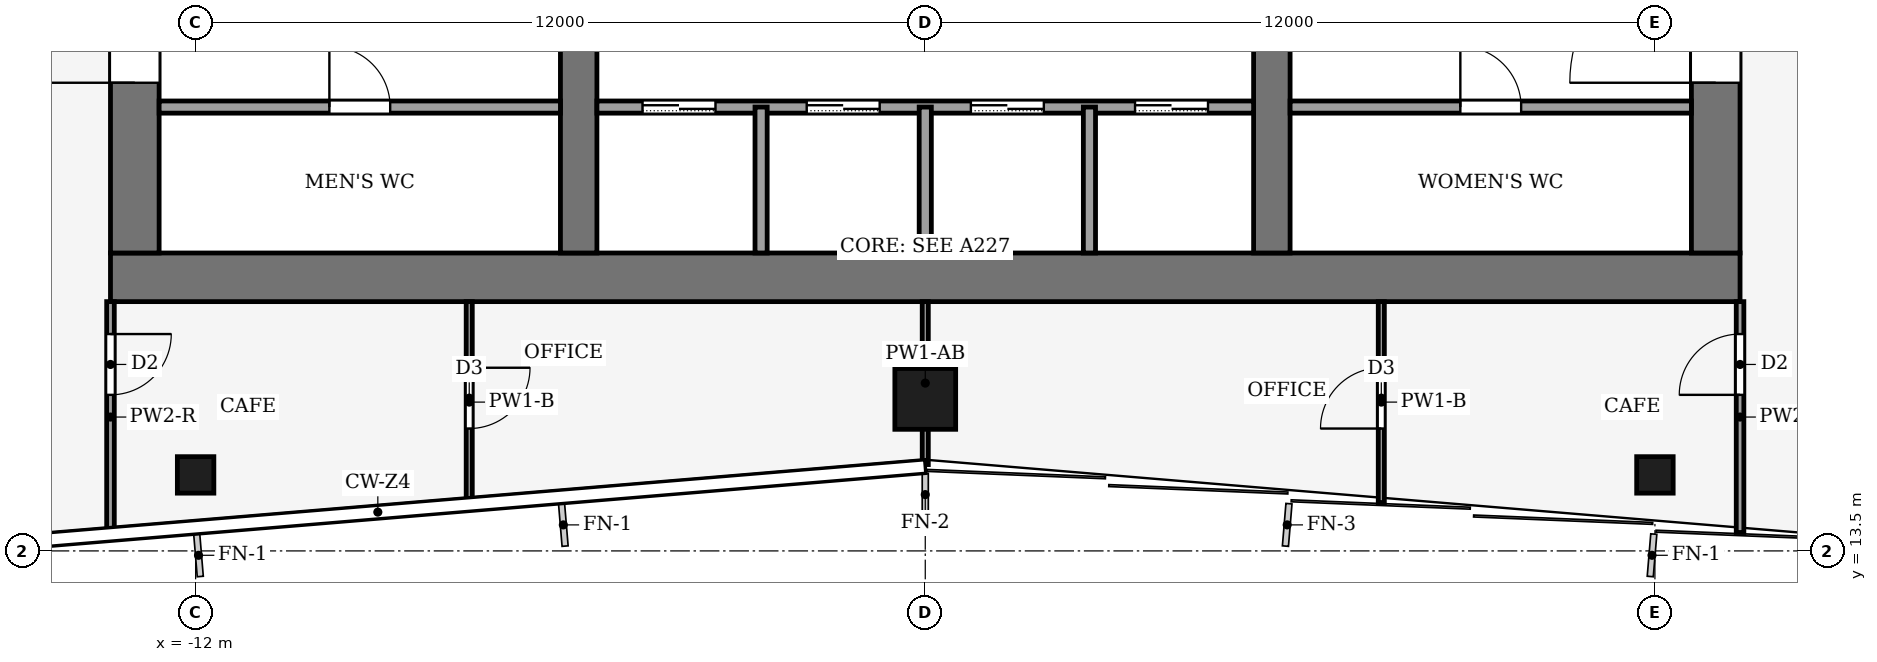
"""IFC4 building model, lengths in metres.
Left out: names, types, materials, properties, quantities, classifications, styles, units other than length and angle.
Written with IfcOpenShell. Run it as: python <this file> out.ifc"""

import sys

from ifc_helpers import new_model, si_unit, direction, frame, frame_2d, origin, origin_2d, place, context, subcontext, project, spatial, rectangle, hollow_rectangle, extrude, element, fill, save


model = new_model("IFC4")
c1 = context("Model", 3, precision=1e-05, world=origin(), true_north=direction((0.0, 1.0)))
c2 = subcontext(c1, "Body", "Model", "MODEL_VIEW")
j1 = project(units=[si_unit("LENGTHUNIT", "METRE"), si_unit("PLANEANGLEUNIT", "RADIAN")], contexts=[c1])
p1 = place(None, origin())
s1 = spatial("IfcSite", under=j1, at=p1, CompositionType="ELEMENT")
p2 = place(p1, origin())
s2 = spatial("IfcBuilding", under=s1, at=p2, CompositionType="ELEMENT")
p3 = place(p2, frame((0.0, 0.0, 233.0)))
s3 = spatial("IfcBuildingStorey", under=s2, at=p3, CompositionType="ELEMENT", Elevation=233.0)
p4 = place(p3, frame((-13.4, 18.0, -0.13), z_axis=(0.0, 0.0, 1.0), x_axis=(1.0, 0.0, 0.0)))
e1 = element("IfcWall", 1, at=p4, inside=s3, PredefinedType="SHEAR", context=c2, shape_type="SweptSolid", body=[
    extrude(rectangle(XDim=26.8, YDim=0.8, at=frame_2d((13.4, 0.0))), origin(), (0.0, 0.0, 1.0), 5.0),
])
p5 = place(p3, frame((-13.0, 18.4, -0.13), z_axis=(0.0, 0.0, 1.0), x_axis=(0.0, 1.0, 0.0)))
e2 = element("IfcWall", 2, at=p5, inside=s3, PredefinedType="SHEAR", context=c2, shape_type="SweptSolid", body=[
    extrude(rectangle(XDim=19.2, YDim=0.8, at=frame_2d((9.6, 0.0))), origin(), (0.0, 0.0, 1.0), 5.0),
])
p6 = place(p5, frame((2.8, 0.0, 0.13)))
e3 = element("IfcOpeningElement", 3, at=p6, cuts=e2, PredefinedType="OPENING", context=c2, shape_type="SweptSolid", body=[
    extrude(rectangle(XDim=2.4, YDim=2.4, at=frame_2d((1.2, 1.2))), frame((0.0, 0.41, 0.0), z_axis=(0.0, -1.0, 0.0), x_axis=(1.0, 0.0, 0.0)), (0.0, 0.0, 1.0), 0.82),
])
p7 = place(p5, frame((13.4, 0.0, 0.13)))
e4 = element("IfcOpeningElement", 4, at=p7, cuts=e2, PredefinedType="OPENING", context=c2, shape_type="SweptSolid", body=[
    extrude(rectangle(XDim=1.4, YDim=2.2, at=frame_2d((0.7, 1.1))), frame((0.0, 0.41, 0.0), z_axis=(0.0, -1.0, 0.0), x_axis=(1.0, 0.0, 0.0)), (0.0, 0.0, 1.0), 0.82),
])
p8 = place(p3, frame((13.0, 18.4, -0.13), z_axis=(0.0, 0.0, 1.0), x_axis=(0.0, 1.0, 0.0)))
e5 = element("IfcWall", 5, at=p8, inside=s3, PredefinedType="SHEAR", context=c2, shape_type="SweptSolid", body=[
    extrude(rectangle(XDim=19.2, YDim=0.8, at=frame_2d((9.6, 0.0))), origin(), (0.0, 0.0, 1.0), 5.0),
])
p9 = place(p8, frame((2.8, 0.0, 0.13)))
e6 = element("IfcOpeningElement", 6, at=p9, cuts=e5, PredefinedType="OPENING", context=c2, shape_type="SweptSolid", body=[
    extrude(rectangle(XDim=2.4, YDim=2.4, at=frame_2d((1.2, 1.2))), frame((0.0, 0.41, 0.0), z_axis=(0.0, -1.0, 0.0), x_axis=(1.0, 0.0, 0.0)), (0.0, 0.0, 1.0), 0.82),
])
p10 = place(p8, frame((13.3, 0.0, 0.13)))
e7 = element("IfcOpeningElement", 7, at=p10, cuts=e5, PredefinedType="OPENING", context=c2, shape_type="SweptSolid", body=[
    extrude(rectangle(XDim=2.4, YDim=2.4, at=frame_2d((1.2, 1.2))), frame((0.0, 0.41, 0.0), z_axis=(0.0, -1.0, 0.0), x_axis=(1.0, 0.0, 0.0)), (0.0, 0.0, 1.0), 0.82),
])
p11 = place(p3, frame((-5.7, 18.4, -0.13), z_axis=(0.0, 0.0, 1.0), x_axis=(0.0, 1.0, 0.0)))
e8 = element("IfcWall", 8, at=p11, inside=s3, PredefinedType="SHEAR", context=c2, shape_type="SweptSolid", body=[
    extrude(rectangle(XDim=19.2, YDim=0.6, at=frame_2d((9.6, 0.0))), origin(), (0.0, 0.0, 1.0), 5.0),
])
p12 = place(p11, frame((8.35, 0.0, 0.13)))
e9 = element("IfcOpeningElement", 9, at=p12, cuts=e8, PredefinedType="OPENING", context=c2, shape_type="SweptSolid", body=[
    extrude(rectangle(XDim=0.9, YDim=2.1, at=frame_2d((0.45, 1.05))), frame((0.0, 0.31, 0.0), z_axis=(0.0, -1.0, 0.0), x_axis=(1.0, 0.0, 0.0)), (0.0, 0.0, 1.0), 0.62),
])
p13 = place(p3, frame((5.7, 18.4, -0.13), z_axis=(0.0, 0.0, 1.0), x_axis=(0.0, 1.0, 0.0)))
e10 = element("IfcWall", 10, at=p13, inside=s3, PredefinedType="SHEAR", context=c2, shape_type="SweptSolid", body=[
    extrude(rectangle(XDim=19.2, YDim=0.6, at=frame_2d((9.6, 0.0))), origin(), (0.0, 0.0, 1.0), 5.0),
])
p14 = place(p13, frame((13.3, 0.0, 0.13)))
e11 = element("IfcOpeningElement", 11, at=p14, cuts=e10, PredefinedType="OPENING", context=c2, shape_type="SweptSolid", body=[
    extrude(rectangle(XDim=2.4, YDim=2.4, at=frame_2d((1.2, 1.2))), frame((0.0, 0.31, 0.0), z_axis=(0.0, -1.0, 0.0), x_axis=(1.0, 0.0, 0.0)), (0.0, 0.0, 1.0), 0.62),
])
p15 = place(p3, frame((0.0, 16.0, 0.0), z_axis=(0.0, 0.0, 1.0), x_axis=(1.0, 0.0, 0.0)))
e12 = element("IfcColumn", 12, at=p15, inside=s3, PredefinedType="COLUMN", context=c2, shape_type="SweptSolid", body=[
    extrude(hollow_rectangle(XDim=1.0, YDim=1.0, WallThickness=0.045, at=origin_2d()), origin(), (0.0, 0.0, 1.0), 5.0),
])
for number, where, z_axis, x_axis in (
    (13, (-12.0, 14.75, 0.0), (0.0, 0.0, 1.0), (1.0, 0.0, 0.0)),
    (14, (12.0, 14.75, 0.0), (0.0, 0.0, 1.0), (1.0, 0.0, 0.0)),
):
    element("IfcColumn", number, at=place(p3, frame(where, z_axis=z_axis, x_axis=x_axis)), inside=s3, PredefinedType="COLUMN", context=c2, shape_type="SweptSolid", body=[
        extrude(hollow_rectangle(XDim=0.6, YDim=0.6, WallThickness=0.025, at=origin_2d()), origin(), (0.0, 0.0, 1.0), 5.0),
    ])
p16 = place(p3, frame((-12.6, 20.8, 0.0), z_axis=(0.0, 0.0, 1.0), x_axis=(1.0, 0.0, 0.0)))
e15 = element("IfcWall", 15, at=p16, inside=s3, PredefinedType="PARTITIONING", context=c2, shape_type="SweptSolid", body=[
    extrude(rectangle(XDim=6.6, YDim=0.2, at=frame_2d((3.3, 0.0))), origin(), (0.0, 0.0, 1.0), 4.87),
])
p17 = place(p16, frame((2.8, 0.0, 0.0)))
e16 = element("IfcOpeningElement", 16, at=p17, cuts=e15, PredefinedType="OPENING", context=c2, shape_type="SweptSolid", body=[
    extrude(rectangle(XDim=1.0, YDim=2.1, at=frame_2d((0.5, 1.05))), frame((0.0, 0.11, 0.0), z_axis=(0.0, -1.0, 0.0), x_axis=(1.0, 0.0, 0.0)), (0.0, 0.0, 1.0), 0.22),
])
p18 = place(p3, frame((-5.4, 20.8, 0.0), z_axis=(0.0, 0.0, 1.0), x_axis=(1.0, 0.0, 0.0)))
e17 = element("IfcWall", 17, at=p18, inside=s3, PredefinedType="PARTITIONING", context=c2, shape_type="SweptSolid", body=[
    extrude(rectangle(XDim=10.8, YDim=0.2, at=frame_2d((5.4, 0.0))), origin(), (0.0, 0.0, 1.0), 4.87),
])
p19 = place(p18, frame((0.75, 0.0, 0.0)))
e18 = element("IfcOpeningElement", 18, at=p19, cuts=e17, PredefinedType="OPENING", context=c2, shape_type="SweptSolid", body=[
    extrude(rectangle(XDim=1.2, YDim=2.2, at=frame_2d((0.6, 1.1))), frame((0.0, 0.11, 0.0), z_axis=(0.0, -1.0, 0.0), x_axis=(1.0, 0.0, 0.0)), (0.0, 0.0, 1.0), 0.22),
])
p20 = place(p18, frame((3.45, 0.0, 0.0)))
e19 = element("IfcOpeningElement", 19, at=p20, cuts=e17, PredefinedType="OPENING", context=c2, shape_type="SweptSolid", body=[
    extrude(rectangle(XDim=1.2, YDim=2.2, at=frame_2d((0.6, 1.1))), frame((0.0, 0.11, 0.0), z_axis=(0.0, -1.0, 0.0), x_axis=(1.0, 0.0, 0.0)), (0.0, 0.0, 1.0), 0.22),
])
p21 = place(p18, frame((6.15, 0.0, 0.0)))
e20 = element("IfcOpeningElement", 20, at=p21, cuts=e17, PredefinedType="OPENING", context=c2, shape_type="SweptSolid", body=[
    extrude(rectangle(XDim=1.2, YDim=2.2, at=frame_2d((0.6, 1.1))), frame((0.0, 0.11, 0.0), z_axis=(0.0, -1.0, 0.0), x_axis=(1.0, 0.0, 0.0)), (0.0, 0.0, 1.0), 0.22),
])
p22 = place(p18, frame((8.85, 0.0, 0.0)))
e21 = element("IfcOpeningElement", 21, at=p22, cuts=e17, PredefinedType="OPENING", context=c2, shape_type="SweptSolid", body=[
    extrude(rectangle(XDim=1.2, YDim=2.2, at=frame_2d((0.6, 1.1))), frame((0.0, 0.11, 0.0), z_axis=(0.0, -1.0, 0.0), x_axis=(1.0, 0.0, 0.0)), (0.0, 0.0, 1.0), 0.22),
])
p23 = place(p3, frame((6.0, 20.8, 0.0), z_axis=(0.0, 0.0, 1.0), x_axis=(1.0, 0.0, 0.0)))
e22 = element("IfcWall", 22, at=p23, inside=s3, PredefinedType="PARTITIONING", context=c2, shape_type="SweptSolid", body=[
    extrude(rectangle(XDim=6.6, YDim=0.2, at=frame_2d((3.3, 0.0))), origin(), (0.0, 0.0, 1.0), 4.87),
])
p24 = place(p23, frame((2.8, 0.0, 0.0)))
e23 = element("IfcOpeningElement", 23, at=p24, cuts=e22, PredefinedType="OPENING", context=c2, shape_type="SweptSolid", body=[
    extrude(rectangle(XDim=1.0, YDim=2.1, at=frame_2d((0.5, 1.05))), frame((0.0, 0.11, 0.0), z_axis=(0.0, -1.0, 0.0), x_axis=(1.0, 0.0, 0.0)), (0.0, 0.0, 1.0), 0.22),
])
for number, where, z_axis, x_axis in (
    (24, (-2.7, 18.4, 0.0), (0.0, 0.0, 1.0), (0.0, 1.0, 0.0)),
    (25, (0.0, 18.4, 0.0), (0.0, 0.0, 1.0), (0.0, 1.0, 0.0)),
    (26, (2.7, 18.4, 0.0), (0.0, 0.0, 1.0), (0.0, 1.0, 0.0)),
):
    element("IfcWall", number, at=place(p3, frame(where, z_axis=z_axis, x_axis=x_axis)), inside=s3, PredefinedType="PARTITIONING", context=c2, shape_type="SweptSolid", body=[
        extrude(rectangle(XDim=2.4, YDim=0.2, at=frame_2d((1.2, 0.0))), origin(), (0.0, 0.0, 1.0), 4.87),
    ])
p25 = place(p3, frame((-13.4, 17.6, 0.0), z_axis=(0.0, 0.0, 1.0), x_axis=(0.0, -1.0, 0.0)))
e27 = element("IfcWall", 27, at=p25, inside=s3, PredefinedType="PARTITIONING", context=c2, shape_type="SweptSolid", body=[
    extrude(rectangle(XDim=3.797, YDim=0.125, at=frame_2d((1.898, 0.0))), origin(), (0.0, 0.0, 1.0), 4.04),
])
p26 = place(p25, frame((0.533, 0.0, 0.0)))
e28 = element("IfcOpeningElement", 28, at=p26, cuts=e27, PredefinedType="OPENING", context=c2, shape_type="SweptSolid", body=[
    extrude(rectangle(XDim=1.0, YDim=2.1, at=frame_2d((0.5, 1.05))), frame((0.0, 0.073, 0.0), z_axis=(0.0, -1.0, 0.0), x_axis=(1.0, 0.0, 0.0)), (0.0, 0.0, 1.0), 0.145),
])
p27 = place(p3, frame((13.4, 13.803, 0.0), z_axis=(0.0, 0.0, 1.0), x_axis=(0.0, 1.0, 0.0)))
e29 = element("IfcWall", 29, at=p27, inside=s3, PredefinedType="PARTITIONING", context=c2, shape_type="SweptSolid", body=[
    extrude(rectangle(XDim=3.797, YDim=0.125, at=frame_2d((1.898, 0.0))), origin(), (0.0, 0.0, 1.0), 4.04),
])
p28 = place(p27, frame((2.263, 0.0, 0.0)))
e30 = element("IfcOpeningElement", 30, at=p28, cuts=e29, PredefinedType="OPENING", context=c2, shape_type="SweptSolid", body=[
    extrude(rectangle(XDim=1.0, YDim=2.1, at=frame_2d((0.5, 1.05))), frame((0.0, 0.073, 0.0), z_axis=(0.0, -1.0, 0.0), x_axis=(1.0, 0.0, 0.0)), (0.0, 0.0, 1.0), 0.145),
])
p29 = place(p3, frame((-7.5, 17.6, 0.0), z_axis=(0.0, 0.0, 1.0), x_axis=(0.0, -1.0, 0.0)))
e31 = element("IfcWall", 31, at=p29, inside=s3, PredefinedType="PARTITIONING", context=c2, shape_type="SweptSolid", body=[
    extrude(rectangle(XDim=3.305, YDim=0.1, at=frame_2d((1.653, 0.0))), origin(), (0.0, 0.0, 1.0), 4.04),
])
p30 = place(p29, frame((1.087, 0.0, 0.0)))
e32 = element("IfcOpeningElement", 32, at=p30, cuts=e31, PredefinedType="OPENING", context=c2, shape_type="SweptSolid", body=[
    extrude(rectangle(XDim=1.0, YDim=2.1, at=frame_2d((0.5, 1.05))), frame((0.0, 0.06, 0.0), z_axis=(0.0, -1.0, 0.0), x_axis=(1.0, 0.0, 0.0)), (0.0, 0.0, 1.0), 0.12),
])
p31 = place(p3, frame((0.0, 14.92, 0.0), z_axis=(0.0, 0.0, 1.0), x_axis=(0.0, 1.0, 0.0)))
e33 = element("IfcWall", 33, at=p31, inside=s3, PredefinedType="PARTITIONING", context=c2, shape_type="SweptSolid", body=[
    extrude(rectangle(XDim=2.68, YDim=0.1, at=frame_2d((1.34, 0.0))), origin(), (0.0, 0.0, 1.0), 4.54),
])
p32 = place(p3, frame((7.5, 14.295, 0.0), z_axis=(0.0, 0.0, 1.0), x_axis=(0.0, 1.0, 0.0)))
e34 = element("IfcWall", 34, at=p32, inside=s3, PredefinedType="PARTITIONING", context=c2, shape_type="SweptSolid", body=[
    extrude(rectangle(XDim=3.305, YDim=0.1, at=frame_2d((1.653, 0.0))), origin(), (0.0, 0.0, 1.0), 4.04),
])
p33 = place(p32, frame((1.218, 0.0, 0.0)))
e35 = element("IfcOpeningElement", 35, at=p33, cuts=e34, PredefinedType="OPENING", context=c2, shape_type="SweptSolid", body=[
    extrude(rectangle(XDim=1.0, YDim=2.1, at=frame_2d((0.5, 1.05))), frame((0.0, 0.06, 0.0), z_axis=(0.0, -1.0, 0.0), x_axis=(1.0, 0.0, 0.0)), (0.0, 0.0, 1.0), 0.12),
])
p34 = place(p19, origin())
e36 = element("IfcDoor", 36, at=p34, inside=s3, OperationType="SLIDING_TO_LEFT", PredefinedType="DOOR", context=c2, shape_type="SweptSolid", body=[
    extrude(rectangle(XDim=1.2, YDim=2.2, at=frame_2d((0.6, 1.1))), frame((0.0, 0.025, 0.0), z_axis=(0.0, -1.0, 0.0), x_axis=(1.0, 0.0, 0.0)), (0.0, 0.0, 1.0), 0.05),
])
fill(e18, e36)
p35 = place(p20, origin())
e37 = element("IfcDoor", 37, at=p35, inside=s3, OperationType="SLIDING_TO_LEFT", PredefinedType="DOOR", context=c2, shape_type="SweptSolid", body=[
    extrude(rectangle(XDim=1.2, YDim=2.2, at=frame_2d((0.6, 1.1))), frame((0.0, 0.025, 0.0), z_axis=(0.0, -1.0, 0.0), x_axis=(1.0, 0.0, 0.0)), (0.0, 0.0, 1.0), 0.05),
])
fill(e19, e37)
p36 = place(p21, origin())
e38 = element("IfcDoor", 38, at=p36, inside=s3, OperationType="SLIDING_TO_LEFT", PredefinedType="DOOR", context=c2, shape_type="SweptSolid", body=[
    extrude(rectangle(XDim=1.2, YDim=2.2, at=frame_2d((0.6, 1.1))), frame((0.0, 0.025, 0.0), z_axis=(0.0, -1.0, 0.0), x_axis=(1.0, 0.0, 0.0)), (0.0, 0.0, 1.0), 0.05),
])
fill(e20, e38)
p37 = place(p22, origin())
e39 = element("IfcDoor", 39, at=p37, inside=s3, OperationType="SLIDING_TO_LEFT", PredefinedType="DOOR", context=c2, shape_type="SweptSolid", body=[
    extrude(rectangle(XDim=1.2, YDim=2.2, at=frame_2d((0.6, 1.1))), frame((0.0, 0.025, 0.0), z_axis=(0.0, -1.0, 0.0), x_axis=(1.0, 0.0, 0.0)), (0.0, 0.0, 1.0), 0.05),
])
fill(e21, e39)
p38 = place(p17, origin())
e40 = element("IfcDoor", 40, at=p38, inside=s3, OperationType="SINGLE_SWING_LEFT", PredefinedType="DOOR", context=c2, shape_type="SweptSolid", body=[
    extrude(rectangle(XDim=1.0, YDim=2.1, at=frame_2d((0.5, 1.05))), frame((0.0, 0.025, 0.0), z_axis=(0.0, -1.0, 0.0), x_axis=(1.0, 0.0, 0.0)), (0.0, 0.0, 1.0), 0.05),
])
fill(e16, e40)
p39 = place(p24, origin())
e41 = element("IfcDoor", 41, at=p39, inside=s3, OperationType="SINGLE_SWING_RIGHT", PredefinedType="DOOR", context=c2, shape_type="SweptSolid", body=[
    extrude(rectangle(XDim=1.0, YDim=2.1, at=frame_2d((0.5, 1.05))), frame((0.0, 0.025, 0.0), z_axis=(0.0, -1.0, 0.0), x_axis=(1.0, 0.0, 0.0)), (0.0, 0.0, 1.0), 0.05),
])
fill(e23, e41)
p40 = place(p6, origin())
e42 = element("IfcDoor", 42, at=p40, inside=s3, OperationType="DOUBLE_DOOR_SINGLE_SWING", PredefinedType="DOOR", context=c2, shape_type="SweptSolid", body=[
    extrude(rectangle(XDim=2.4, YDim=2.4, at=frame_2d((1.2, 1.2))), frame((0.0, 0.025, 0.0), z_axis=(0.0, -1.0, 0.0), x_axis=(1.0, 0.0, 0.0)), (0.0, 0.0, 1.0), 0.05),
])
fill(e3, e42)
p41 = place(p9, origin())
e43 = element("IfcDoor", 43, at=p41, inside=s3, OperationType="DOUBLE_DOOR_SINGLE_SWING", PredefinedType="DOOR", context=c2, shape_type="SweptSolid", body=[
    extrude(rectangle(XDim=2.4, YDim=2.4, at=frame_2d((1.2, 1.2))), frame((0.0, 0.025, 0.0), z_axis=(0.0, -1.0, 0.0), x_axis=(1.0, 0.0, 0.0)), (0.0, 0.0, 1.0), 0.05),
])
fill(e6, e43)
p42 = place(p26, origin())
e44 = element("IfcDoor", 44, at=p42, inside=s3, OperationType="SINGLE_SWING_LEFT", PredefinedType="DOOR", context=c2, shape_type="SweptSolid", body=[
    extrude(rectangle(XDim=1.0, YDim=2.1, at=frame_2d((0.5, 1.05))), frame((0.0, 0.025, 0.0), z_axis=(0.0, -1.0, 0.0), x_axis=(1.0, 0.0, 0.0)), (0.0, 0.0, 1.0), 0.05),
])
fill(e28, e44)
p43 = place(p28, origin())
e45 = element("IfcDoor", 45, at=p43, inside=s3, OperationType="SINGLE_SWING_RIGHT", PredefinedType="DOOR", context=c2, shape_type="SweptSolid", body=[
    extrude(rectangle(XDim=1.0, YDim=2.1, at=frame_2d((0.5, 1.05))), frame((0.0, 0.025, 0.0), z_axis=(0.0, -1.0, 0.0), x_axis=(1.0, 0.0, 0.0)), (0.0, 0.0, 1.0), 0.05),
])
fill(e30, e45)
p44 = place(p30, origin())
e46 = element("IfcDoor", 46, at=p44, inside=s3, OperationType="SINGLE_SWING_LEFT", PredefinedType="DOOR", context=c2, shape_type="SweptSolid", body=[
    extrude(rectangle(XDim=1.0, YDim=2.1, at=frame_2d((0.5, 1.05))), frame((0.0, 0.025, 0.0), z_axis=(0.0, -1.0, 0.0), x_axis=(1.0, 0.0, 0.0)), (0.0, 0.0, 1.0), 0.05),
])
fill(e32, e46)
p45 = place(p33, origin())
e47 = element("IfcDoor", 47, at=p45, inside=s3, OperationType="SINGLE_SWING_RIGHT", PredefinedType="DOOR", context=c2, shape_type="SweptSolid", body=[
    extrude(rectangle(XDim=1.0, YDim=2.1, at=frame_2d((0.5, 1.05))), frame((0.0, 0.025, 0.0), z_axis=(0.0, -1.0, 0.0), x_axis=(1.0, 0.0, 0.0)), (0.0, 0.0, 1.0), 0.05),
])
fill(e35, e47)
save(model, sys.argv[1])
